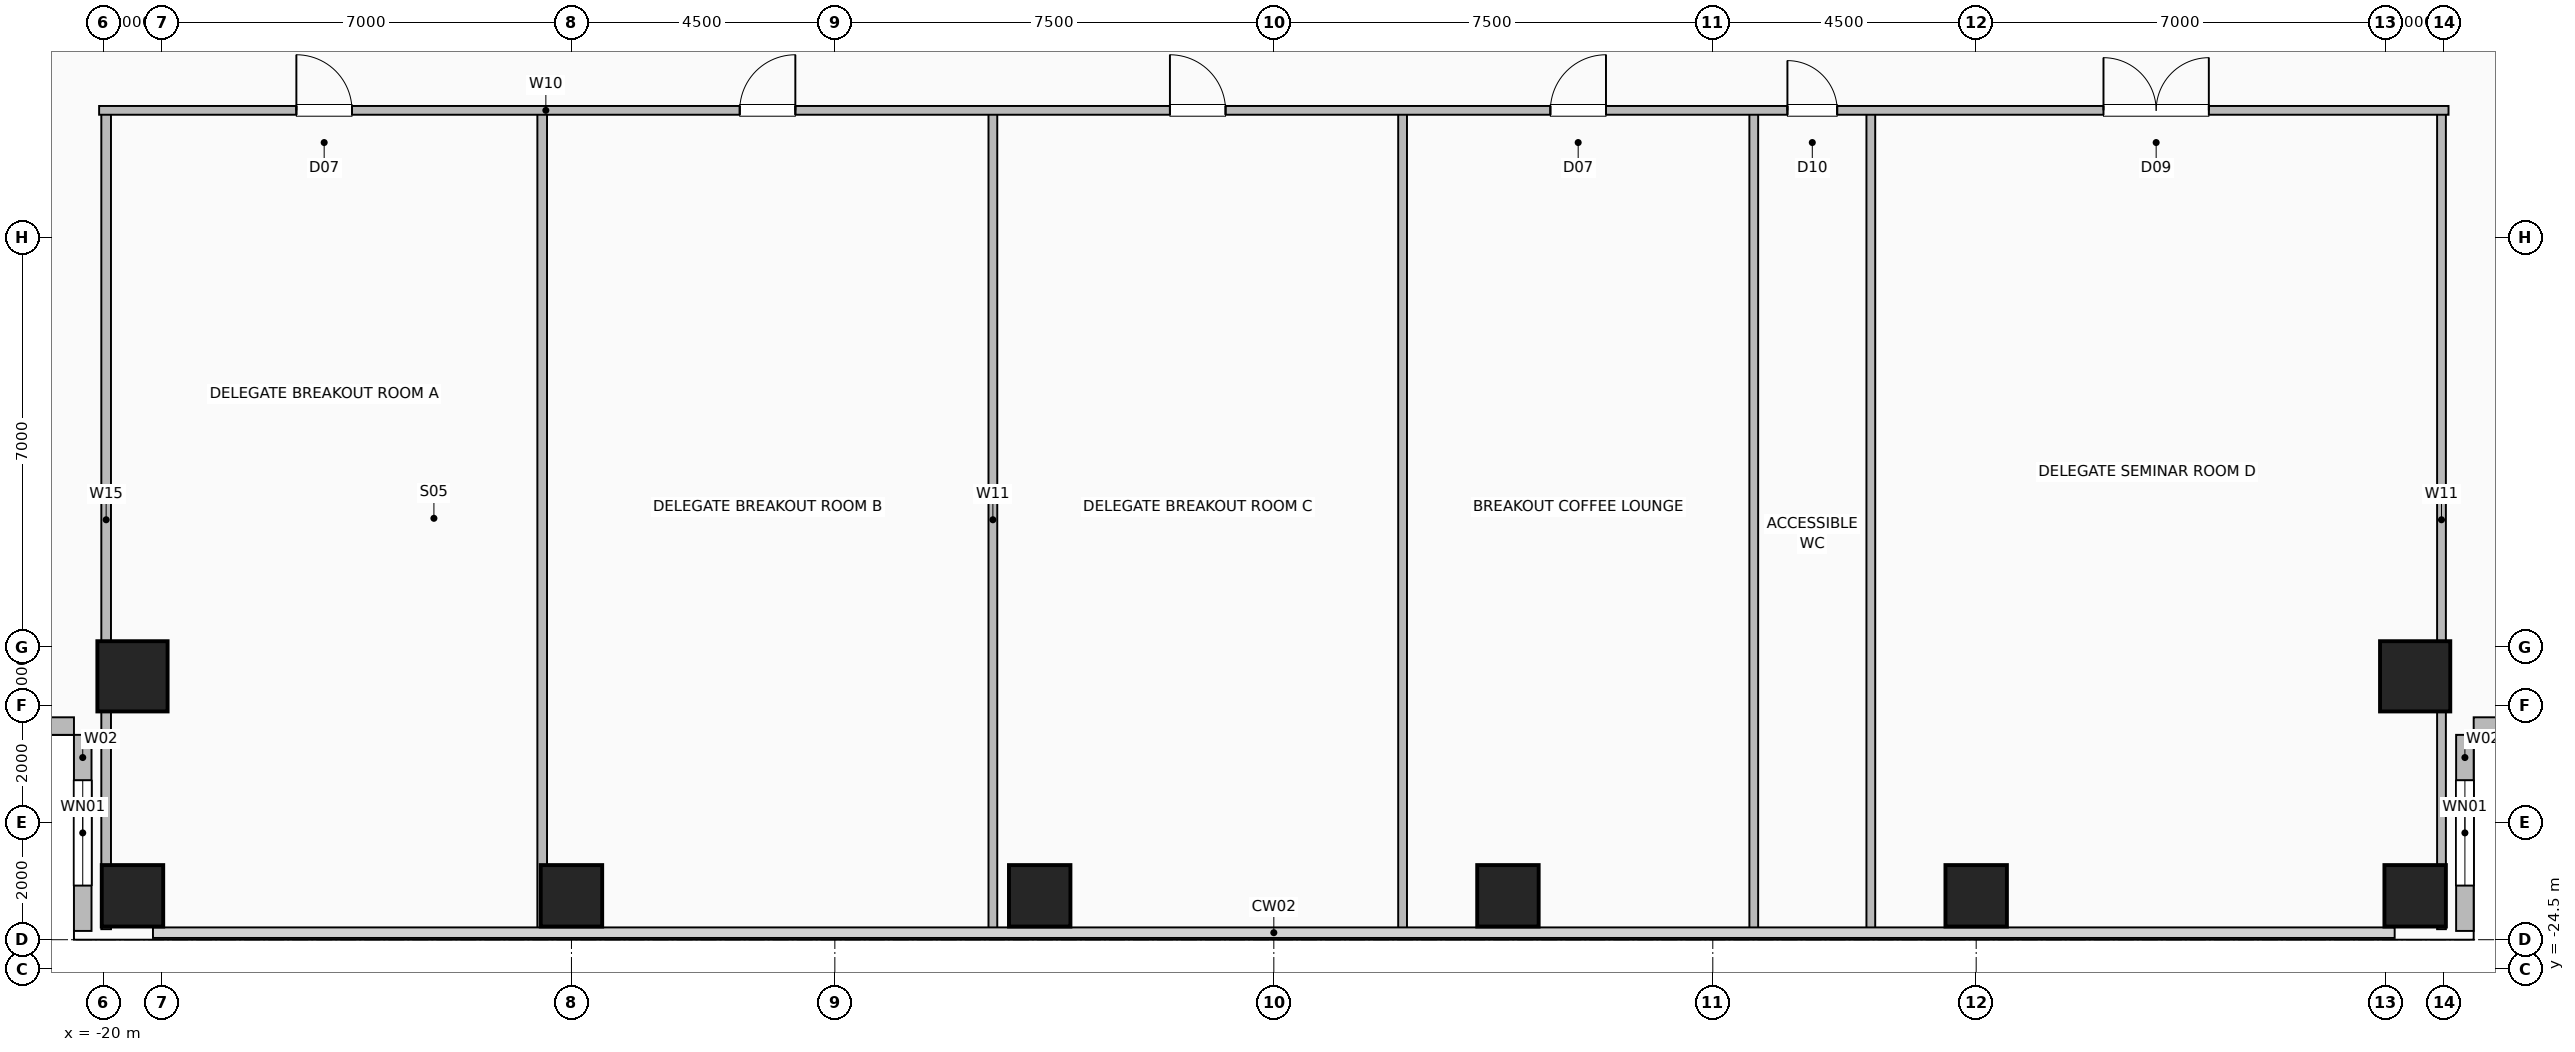
"""IFC4 building model, lengths in metres.
Left out: names, types, materials, properties, quantities, classifications, styles, units other than length and angle.
Written with IfcOpenShell. Run it as: python <this file> out.ifc"""

import sys

from ifc_helpers import new_model, si_unit, direction, frame, frame_2d, origin, origin_2d, place, context, subcontext, project, spatial, rectangle, hollow_rectangle, extrude, element, fill, save


model = new_model("IFC4")
c1 = context("Model", 3, precision=1e-05, world=origin(), true_north=direction((0.0, 1.0)))
c2 = subcontext(c1, "Body", "Model", "MODEL_VIEW")
j1 = project(units=[si_unit("LENGTHUNIT", "METRE"), si_unit("PLANEANGLEUNIT", "RADIAN")], contexts=[c1])
p1 = place(None, origin())
s1 = spatial("IfcSite", under=j1, at=p1, CompositionType="ELEMENT")
p2 = place(p1, origin())
s2 = spatial("IfcBuilding", under=s1, at=p2, CompositionType="ELEMENT")
p3 = place(p2, frame((0.0, 0.0, 41.0)))
s3 = spatial("IfcBuildingStorey", under=s2, at=p3, CompositionType="ELEMENT", Elevation=41.0)
for number, where, z_axis, x_axis in (
    (1, (-19.5, -23.25, 0.0), (0.0, 0.0, 1.0), (1.0, 0.0, 0.0)),
    (2, (-12.0, -23.25, 0.0), (0.0, 0.0, 1.0), (1.0, 0.0, 0.0)),
    (3, (-4.0, -23.25, 0.0), (0.0, 0.0, 1.0), (1.0, 0.0, 0.0)),
    (4, (4.0, -23.25, 0.0), (0.0, 0.0, 1.0), (1.0, 0.0, 0.0)),
    (5, (12.0, -23.25, 0.0), (0.0, 0.0, 1.0), (1.0, 0.0, 0.0)),
    (6, (19.5, -23.25, 0.0), (0.0, 0.0, 1.0), (1.0, 0.0, 0.0)),
):
    element("IfcColumn", number, at=place(p3, frame(where, z_axis=z_axis, x_axis=x_axis)), inside=s3, PredefinedType="COLUMN", context=c2, shape_type="SweptSolid", body=[
        extrude(hollow_rectangle(XDim=1.05, YDim=1.05, WallThickness=0.05, at=origin_2d()), origin(), (0.0, 0.0, 1.0), 3.5),
    ])
for number, where, z_axis, x_axis in (
    (7, (-19.5, -19.5, 0.0), (0.0, 0.0, 1.0), (1.0, 0.0, 0.0)),
    (8, (19.5, -19.5, 0.0), (0.0, 0.0, 1.0), (1.0, 0.0, 0.0)),
):
    element("IfcColumn", number, at=place(p3, frame(where, z_axis=z_axis, x_axis=x_axis)), inside=s3, PredefinedType="COLUMN", context=c2, shape_type="SweptSolid", body=[
        extrude(hollow_rectangle(XDim=1.2, YDim=1.2, WallThickness=0.055, at=origin_2d()), origin(), (0.0, 0.0, 1.0), 3.5),
    ])
p4 = place(p3, frame((-20.35, -23.85, 0.0), z_axis=(0.0, 0.0, 1.0), x_axis=(0.0, 1.0, 0.0)))
e9 = element("IfcWall", 9, at=p4, inside=s3, PredefinedType="SOLIDWALL", context=c2, shape_type="SweptSolid", body=[
    extrude(rectangle(XDim=3.35, YDim=0.3, at=frame_2d((1.675, 0.0))), origin(), (0.0, 0.0, 1.0), 3.25),
])
p5 = place(p4, frame((0.775, 0.0, 0.9)))
e10 = element("IfcOpeningElement", 10, at=p5, cuts=e9, PredefinedType="OPENING", context=c2, shape_type="SweptSolid", body=[
    extrude(rectangle(XDim=1.8, YDim=1.8, at=frame_2d((0.9, 0.9))), frame((0.0, 0.16, 0.0), z_axis=(0.0, -1.0, 0.0), x_axis=(1.0, 0.0, 0.0)), (0.0, 0.0, 1.0), 0.32),
])
p6 = place(p3, frame((-23.85, -20.35, 0.0), z_axis=(0.0, 0.0, 1.0), x_axis=(1.0, 0.0, 0.0)))
e11 = element("IfcWall", 11, at=p6, inside=s3, PredefinedType="SOLIDWALL", context=c2, shape_type="SweptSolid", body=[
    extrude(rectangle(XDim=3.35, YDim=0.3, at=frame_2d((1.675, 0.0))), origin(), (0.0, 0.0, 1.0), 3.25),
])
p7 = place(p3, frame((20.35, -23.85, 0.0), z_axis=(0.0, 0.0, 1.0), x_axis=(0.0, 1.0, 0.0)))
e12 = element("IfcWall", 12, at=p7, inside=s3, PredefinedType="SOLIDWALL", context=c2, shape_type="SweptSolid", body=[
    extrude(rectangle(XDim=3.35, YDim=0.3, at=frame_2d((1.675, 0.0))), origin(), (0.0, 0.0, 1.0), 3.25),
])
p8 = place(p7, frame((0.775, 0.0, 0.9)))
e13 = element("IfcOpeningElement", 13, at=p8, cuts=e12, PredefinedType="OPENING", context=c2, shape_type="SweptSolid", body=[
    extrude(rectangle(XDim=1.8, YDim=1.8, at=frame_2d((0.9, 0.9))), frame((0.0, 0.16, 0.0), z_axis=(0.0, -1.0, 0.0), x_axis=(1.0, 0.0, 0.0)), (0.0, 0.0, 1.0), 0.32),
])
p9 = place(p3, frame((23.85, -20.35, 0.0), z_axis=(0.0, 0.0, 1.0), x_axis=(-1.0, 0.0, 0.0)))
e14 = element("IfcWall", 14, at=p9, inside=s3, PredefinedType="SOLIDWALL", context=c2, shape_type="SweptSolid", body=[
    extrude(rectangle(XDim=3.35, YDim=0.3, at=frame_2d((1.675, 0.0))), origin(), (0.0, 0.0, 1.0), 3.25),
])
for number, where, z_axis, x_axis in (
    (15, (-19.95, -23.82, 0.0), (0.0, 0.0, 1.0), (0.0, 1.0, 0.0)),
    (16, (-12.5, -23.82, 0.0), (0.0, 0.0, 1.0), (0.0, 1.0, 0.0)),
):
    element("IfcWall", number, at=place(p3, frame(where, z_axis=z_axis, x_axis=x_axis)), inside=s3, PredefinedType="PLUMBINGWALL", context=c2, shape_type="SweptSolid", body=[
        extrude(rectangle(XDim=13.99, YDim=0.165, at=frame_2d((6.995, 0.0))), origin(), (0.0, 0.0, 1.0), 3.25),
    ])
p10 = place(p3, frame((-4.8, -23.82, 0.0), z_axis=(0.0, 0.0, 1.0), x_axis=(0.0, 1.0, 0.0)))
e17 = element("IfcWall", 17, at=p10, inside=s3, PredefinedType="PARTITIONING", context=c2, shape_type="SweptSolid", body=[
    extrude(rectangle(XDim=13.99, YDim=0.15, at=frame_2d((6.995, 0.0))), origin(), (0.0, 0.0, 1.0), 2.818),
])
for number, where, z_axis, x_axis in (
    (18, (2.2, -23.82, 0.0), (0.0, 0.0, 1.0), (0.0, 1.0, 0.0)),
    (19, (8.2, -23.82, 0.0), (0.0, 0.0, 1.0), (0.0, 1.0, 0.0)),
    (20, (10.2, -23.82, 0.0), (0.0, 0.0, 1.0), (0.0, 1.0, 0.0)),
    (21, (19.95, -23.82, 0.0), (0.0, 0.0, 1.0), (0.0, 1.0, 0.0)),
):
    element("IfcWall", number, at=place(p3, frame(where, z_axis=z_axis, x_axis=x_axis)), inside=s3, PredefinedType="PARTITIONING", context=c2, shape_type="SweptSolid", body=[
        extrude(rectangle(XDim=13.99, YDim=0.15, at=frame_2d((6.995, 0.0))), origin(), (0.0, 0.0, 1.0), 3.25),
    ])
p11 = place(p3, frame((-20.07, -9.83, 0.0), z_axis=(0.0, 0.0, 1.0), x_axis=(1.0, 0.0, 0.0)))
e22 = element("IfcWall", 22, at=p11, inside=s3, PredefinedType="PARTITIONING", context=c2, shape_type="SweptSolid", body=[
    extrude(rectangle(XDim=40.14, YDim=0.15, at=frame_2d((20.07, 0.0))), origin(), (0.0, 0.0, 1.0), 3.25),
])
p12 = place(p11, frame((3.37, 0.0, 0.0)))
e23 = element("IfcOpeningElement", 23, at=p12, cuts=e22, PredefinedType="OPENING", context=c2, shape_type="SweptSolid", body=[
    extrude(rectangle(XDim=0.95, YDim=2.06, at=frame_2d((0.475, 1.03))), frame((0.0, 0.085, 0.0), z_axis=(0.0, -1.0, 0.0), x_axis=(1.0, 0.0, 0.0)), (0.0, 0.0, 1.0), 0.17),
])
p13 = place(p11, frame((10.945, 0.0, 0.0)))
e24 = element("IfcOpeningElement", 24, at=p13, cuts=e22, PredefinedType="OPENING", context=c2, shape_type="SweptSolid", body=[
    extrude(rectangle(XDim=0.95, YDim=2.06, at=frame_2d((0.475, 1.03))), frame((0.0, 0.085, 0.0), z_axis=(0.0, -1.0, 0.0), x_axis=(1.0, 0.0, 0.0)), (0.0, 0.0, 1.0), 0.17),
])
p14 = place(p11, frame((18.295, 0.0, 0.0)))
e25 = element("IfcOpeningElement", 25, at=p14, cuts=e22, PredefinedType="OPENING", context=c2, shape_type="SweptSolid", body=[
    extrude(rectangle(XDim=0.95, YDim=2.06, at=frame_2d((0.475, 1.03))), frame((0.0, 0.085, 0.0), z_axis=(0.0, -1.0, 0.0), x_axis=(1.0, 0.0, 0.0)), (0.0, 0.0, 1.0), 0.17),
])
p15 = place(p11, frame((24.795, 0.0, 0.0)))
e26 = element("IfcOpeningElement", 26, at=p15, cuts=e22, PredefinedType="OPENING", context=c2, shape_type="SweptSolid", body=[
    extrude(rectangle(XDim=0.95, YDim=2.06, at=frame_2d((0.475, 1.03))), frame((0.0, 0.085, 0.0), z_axis=(0.0, -1.0, 0.0), x_axis=(1.0, 0.0, 0.0)), (0.0, 0.0, 1.0), 0.17),
])
p16 = place(p11, frame((28.845, 0.0, 0.0)))
e27 = element("IfcOpeningElement", 27, at=p16, cuts=e22, PredefinedType="OPENING", context=c2, shape_type="SweptSolid", body=[
    extrude(rectangle(XDim=0.85, YDim=2.05, at=frame_2d((0.425, 1.025))), frame((0.0, 0.085, 0.0), z_axis=(0.0, -1.0, 0.0), x_axis=(1.0, 0.0, 0.0)), (0.0, 0.0, 1.0), 0.17),
])
p17 = place(p11, frame((34.245, 0.0, 0.0)))
e28 = element("IfcOpeningElement", 28, at=p17, cuts=e22, PredefinedType="OPENING", context=c2, shape_type="SweptSolid", body=[
    extrude(rectangle(XDim=1.8, YDim=2.08, at=frame_2d((0.9, 1.04))), frame((0.0, 0.085, 0.0), z_axis=(0.0, -1.0, 0.0), x_axis=(1.0, 0.0, 0.0)), (0.0, 0.0, 1.0), 0.17),
])
p18 = place(p5, origin())
e29 = element("IfcWindow", 29, at=p18, inside=s3, PartitioningType="SINGLE_PANEL", PredefinedType="WINDOW", context=c2, shape_type="SweptSolid", body=[
    extrude(rectangle(XDim=1.8, YDim=1.8, at=frame_2d((0.9, 0.9))), frame((0.0, 0.03, 0.0), z_axis=(0.0, -1.0, 0.0), x_axis=(1.0, 0.0, 0.0)), (0.0, 0.0, 1.0), 0.06),
])
fill(e10, e29)
p19 = place(p8, origin())
e30 = element("IfcWindow", 30, at=p19, inside=s3, PartitioningType="SINGLE_PANEL", PredefinedType="WINDOW", context=c2, shape_type="SweptSolid", body=[
    extrude(rectangle(XDim=1.8, YDim=1.8, at=frame_2d((0.9, 0.9))), frame((0.0, 0.03, 0.0), z_axis=(0.0, -1.0, 0.0), x_axis=(1.0, 0.0, 0.0)), (0.0, 0.0, 1.0), 0.06),
])
fill(e13, e30)
p20 = place(p12, origin())
e31 = element("IfcDoor", 31, at=p20, inside=s3, OperationType="SINGLE_SWING_LEFT", PredefinedType="DOOR", context=c2, shape_type="SweptSolid", body=[
    extrude(rectangle(XDim=0.95, YDim=2.06, at=frame_2d((0.475, 1.03))), frame((0.0, 0.025, 0.0), z_axis=(0.0, -1.0, 0.0), x_axis=(1.0, 0.0, 0.0)), (0.0, 0.0, 1.0), 0.05),
])
fill(e23, e31)
p21 = place(p13, origin())
e32 = element("IfcDoor", 32, at=p21, inside=s3, OperationType="SINGLE_SWING_RIGHT", PredefinedType="DOOR", context=c2, shape_type="SweptSolid", body=[
    extrude(rectangle(XDim=0.95, YDim=2.06, at=frame_2d((0.475, 1.03))), frame((0.0, 0.025, 0.0), z_axis=(0.0, -1.0, 0.0), x_axis=(1.0, 0.0, 0.0)), (0.0, 0.0, 1.0), 0.05),
])
fill(e24, e32)
p22 = place(p14, origin())
e33 = element("IfcDoor", 33, at=p22, inside=s3, OperationType="SINGLE_SWING_LEFT", PredefinedType="DOOR", context=c2, shape_type="SweptSolid", body=[
    extrude(rectangle(XDim=0.95, YDim=2.06, at=frame_2d((0.475, 1.03))), frame((0.0, 0.025, 0.0), z_axis=(0.0, -1.0, 0.0), x_axis=(1.0, 0.0, 0.0)), (0.0, 0.0, 1.0), 0.05),
])
fill(e25, e33)
p23 = place(p15, origin())
e34 = element("IfcDoor", 34, at=p23, inside=s3, OperationType="SINGLE_SWING_RIGHT", PredefinedType="DOOR", context=c2, shape_type="SweptSolid", body=[
    extrude(rectangle(XDim=0.95, YDim=2.06, at=frame_2d((0.475, 1.03))), frame((0.0, 0.025, 0.0), z_axis=(0.0, -1.0, 0.0), x_axis=(1.0, 0.0, 0.0)), (0.0, 0.0, 1.0), 0.05),
])
fill(e26, e34)
p24 = place(p16, origin())
e35 = element("IfcDoor", 35, at=p24, inside=s3, OperationType="SINGLE_SWING_LEFT", PredefinedType="DOOR", context=c2, shape_type="SweptSolid", body=[
    extrude(rectangle(XDim=0.85, YDim=2.05, at=frame_2d((0.425, 1.025))), frame((0.0, 0.025, 0.0), z_axis=(0.0, -1.0, 0.0), x_axis=(1.0, 0.0, 0.0)), (0.0, 0.0, 1.0), 0.05),
])
fill(e27, e35)
p25 = place(p17, origin())
e36 = element("IfcDoor", 36, at=p25, inside=s3, OperationType="DOUBLE_DOOR_SINGLE_SWING", PredefinedType="DOOR", context=c2, shape_type="SweptSolid", body=[
    extrude(rectangle(XDim=1.8, YDim=2.08, at=frame_2d((0.9, 1.04))), frame((0.0, 0.025, 0.0), z_axis=(0.0, -1.0, 0.0), x_axis=(1.0, 0.0, 0.0)), (0.0, 0.0, 1.0), 0.05),
])
fill(e28, e36)
save(model, sys.argv[1])
